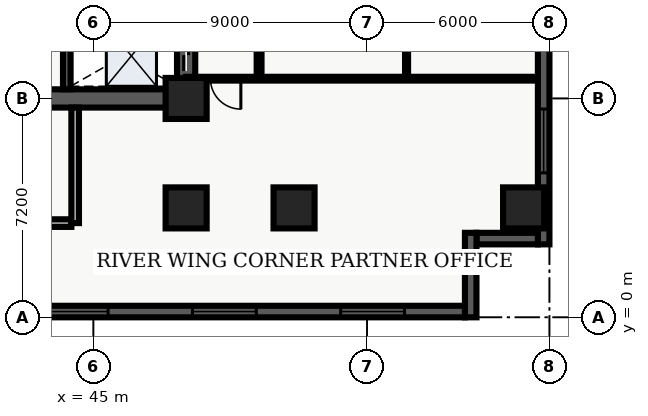
"""IFC4 building model, lengths in metres.
Left out: names, types, materials, properties, quantities, classifications, styles, units other than length and angle.
Written with IfcOpenShell. Run it as: python <this file> out.ifc"""

import sys

from ifc_helpers import new_model, entity, si_unit, converted_unit, direction, frame, origin_with_axes, origin_2d_with_axis, place, context, subcontext, project, spatial, polyline, rectangle, outline, extrude, element, fill, save


model = new_model("IFC4")
c1 = context("Model", 3, precision=1e-05, world=origin_with_axes(), true_north=direction((0.0, 1.0)))
c2 = subcontext(c1, "Body", "Model", "MODEL_VIEW")
j1 = project(units=[si_unit("LENGTHUNIT", "METRE"), converted_unit("PLANEANGLEUNIT", "DEGREE", entity("IfcPlaneAngleMeasure", 0.017), si_unit("PLANEANGLEUNIT", "RADIAN"), dimensions=[0, 0, 0, 0, 0, 0, 0])], contexts=[c1])
p1 = place(None, origin_with_axes())
s1 = spatial("IfcSite", under=j1, at=p1, CompositionType="ELEMENT")
p2 = place(p1, origin_with_axes())
s2 = spatial("IfcBuilding", under=s1, at=p2, CompositionType="ELEMENT")
p3 = place(p2, frame((0.0, 0.0, 36.6), z_axis=(0.0, 0.0, 1.0), x_axis=(1.0, 0.0, 0.0)))
s3 = spatial("IfcBuildingStorey", under=s2, at=p3, CompositionType="ELEMENT", Elevation=36.6)
p4 = place(p3, frame((40.2, 7.2, 0.0), z_axis=(0.0, 0.0, 1.0), x_axis=(1.0, 0.0, 0.0)))
e1 = element("IfcWall", 1, at=p4, inside=s3, PredefinedType="SHEAR", context=c2, shape_type="SweptSolid", body=[
    extrude(outline(polyline([(0.0, -0.3), (7.85, -0.3), (7.85, 0.3), (0.0, 0.3), (0.0, -0.3)])), origin_with_axes(), (0.0, 0.0, 1.0), 3.66),
])
p5 = place(p4, frame((2.175, 0.0, 0.0), z_axis=(0.0, 0.0, 1.0), x_axis=(1.0, 0.0, 0.0)))
e2 = element("IfcOpeningElement", 2, at=p5, cuts=e1, PredefinedType="OPENING", context=c2, shape_type="SweptSolid", body=[
    extrude(rectangle(XDim=1.05, YDim=0.62, at=origin_2d_with_axis()), origin_with_axes(), (0.0, 0.0, 1.0), 2.15),
])
p6 = place(p3, frame((48.05, 7.2, 0.0), z_axis=(0.0, 0.0, 1.0), x_axis=(0.0, 1.0, 0.0)))
e3 = element("IfcWall", 3, at=p6, inside=s3, PredefinedType="SHEAR", context=c2, shape_type="SweptSolid", body=[
    extrude(outline(polyline([(0.0, -0.3), (15.6, -0.3), (15.6, 0.3), (0.0, 0.3), (0.0, -0.3)])), origin_with_axes(), (0.0, 0.0, 1.0), 3.66),
])
p7 = place(p6, frame((1.425, 0.0, 0.0), z_axis=(0.0, 0.0, 1.0), x_axis=(1.0, 0.0, 0.0)))
e4 = element("IfcOpeningElement", 4, at=p7, cuts=e3, PredefinedType="OPENING", context=c2, shape_type="SweptSolid", body=[
    extrude(rectangle(XDim=1.05, YDim=0.62, at=origin_2d_with_axis()), origin_with_axes(), (0.0, 0.0, 1.0), 2.15),
])
p8 = place(p6, frame((3.475, 0.0, 0.0), z_axis=(0.0, 0.0, 1.0), x_axis=(1.0, 0.0, 0.0)))
e5 = element("IfcOpeningElement", 5, at=p8, cuts=e3, PredefinedType="OPENING", context=c2, shape_type="SweptSolid", body=[
    extrude(rectangle(XDim=1.05, YDim=0.62, at=origin_2d_with_axis()), origin_with_axes(), (0.0, 0.0, 1.0), 2.15),
])
p9 = place(p6, frame((5.625, 0.0, 0.0), z_axis=(0.0, 0.0, 1.0), x_axis=(1.0, 0.0, 0.0)))
e6 = element("IfcOpeningElement", 6, at=p9, cuts=e3, PredefinedType="OPENING", context=c2, shape_type="SweptSolid", body=[
    extrude(rectangle(XDim=0.95, YDim=0.62, at=origin_2d_with_axis()), origin_with_axes(), (0.0, 0.0, 1.0), 2.15),
])
p10 = place(p3, frame((44.125, 7.5, 0.0), z_axis=(0.0, 0.0, 1.0), x_axis=(0.0, 1.0, 0.0)))
e7 = element("IfcWall", 7, at=p10, inside=s3, PredefinedType="SHEAR", context=c2, shape_type="SweptSolid", body=[
    extrude(outline(polyline([(0.0, -0.125), (15.0, -0.125), (15.0, 0.125), (0.0, 0.125), (0.0, -0.125)])), origin_with_axes(), (0.0, 0.0, 1.0), 3.66),
])
p11 = place(p3, frame((40.325, 3.1, 0.0), z_axis=(0.0, 0.0, 1.0), x_axis=(1.0, 0.0, 0.0)))
e8 = element("IfcWall", 8, at=p11, inside=s3, PredefinedType="SOLIDWALL", context=c2, shape_type="SweptSolid", body=[
    extrude(outline(polyline([(0.0, -0.125), (3.95, -0.125), (3.95, 0.125), (0.0, 0.125), (0.0, -0.125)])), origin_with_axes(), (0.0, 0.0, 1.0), 2.7),
])
p12 = place(p3, frame((44.4, 3.1, 0.0), z_axis=(0.0, 0.0, 1.0), x_axis=(0.0, 1.0, 0.0)))
e9 = element("IfcWall", 9, at=p12, inside=s3, PredefinedType="SOLIDWALL", context=c2, shape_type="SweptSolid", body=[
    extrude(outline(polyline([(0.0, -0.125), (3.8, -0.125), (3.8, 0.125), (0.0, 0.125), (0.0, -0.125)])), origin_with_axes(), (0.0, 0.0, 1.0), 2.7),
])
for number, where, z_axis, x_axis in (
    (10, (48.05, 3.6, 0.0), (0.0, 0.0, 1.0), (1.0, 0.0, 0.0)),
    (11, (48.05, 7.2, 0.0), (0.0, 0.0, 1.0), (1.0, 0.0, 0.0)),
    (12, (51.6, 3.6, 0.0), (0.0, 0.0, 1.0), (1.0, 0.0, 0.0)),
    (13, (59.15, 3.6, 0.0), (0.0, 0.0, 1.0), (1.0, 0.0, 0.0)),
):
    element("IfcColumn", number, at=place(p3, frame(where, z_axis=z_axis, x_axis=x_axis)), inside=s3, PredefinedType="COLUMN", context=c2, shape_type="SweptSolid", body=[
        extrude(rectangle(XDim=1.35, YDim=1.35, at=origin_2d_with_axis()), origin_with_axes(), (0.0, 0.0, 1.0), 3.9),
    ])
p13 = place(p3, frame((50.45, 7.85, 0.0), z_axis=(0.0, 0.0, 1.0), x_axis=(0.0, 1.0, 0.0)))
e14 = element("IfcWall", 14, at=p13, inside=s3, PredefinedType="PARTITIONING", context=c2, shape_type="SweptSolid", body=[
    extrude(outline(polyline([(0.0, -0.08), (18.8, -0.08), (18.8, 0.08), (0.0, 0.08), (0.0, -0.08)])), origin_with_axes(), (0.0, 0.0, 1.0), 2.7),
])
p14 = place(p13, frame((4.564, 0.0, 0.0), z_axis=(0.0, 0.0, 1.0), x_axis=(1.0, 0.0, 0.0)))
e15 = element("IfcOpeningElement", 15, at=p14, cuts=e14, PredefinedType="OPENING", context=c2, shape_type="SweptSolid", body=[
    extrude(rectangle(XDim=1.0, YDim=0.18, at=origin_2d_with_axis()), origin_with_axes(), (0.0, 0.0, 1.0), 2.15),
])
p15 = place(p13, frame((11.541, 0.0, 0.0), z_axis=(0.0, 0.0, 1.0), x_axis=(1.0, 0.0, 0.0)))
e16 = element("IfcOpeningElement", 16, at=p15, cuts=e14, PredefinedType="OPENING", context=c2, shape_type="SweptSolid", body=[
    extrude(rectangle(XDim=1.0, YDim=0.18, at=origin_2d_with_axis()), origin_with_axes(), (0.0, 0.0, 1.0), 2.15),
])
p16 = place(p13, frame((14.125, 0.0, 0.0), z_axis=(0.0, 0.0, 1.0), x_axis=(1.0, 0.0, 0.0)))
e17 = element("IfcOpeningElement", 17, at=p16, cuts=e14, PredefinedType="OPENING", context=c2, shape_type="SweptSolid", body=[
    extrude(rectangle(XDim=1.0, YDim=0.18, at=origin_2d_with_axis()), origin_with_axes(), (0.0, 0.0, 1.0), 2.15),
])
p17 = place(p3, frame((59.64, 7.85, 0.0), z_axis=(0.0, 0.0, 1.0), x_axis=(-1.0, 0.0, 0.0)))
e18 = element("IfcWall", 18, at=p17, inside=s3, PredefinedType="PARTITIONING", context=c2, shape_type="SweptSolid", body=[
    extrude(outline(polyline([(0.0, -0.062), (11.59, -0.062), (11.59, 0.062), (0.0, 0.062), (0.0, -0.062)])), origin_with_axes(), (0.0, 0.0, 1.0), 2.7),
])
p18 = place(p17, frame((10.29, 0.0, 0.0), z_axis=(0.0, 0.0, 1.0), x_axis=(1.0, 0.0, 0.0)))
e19 = element("IfcOpeningElement", 19, at=p18, cuts=e18, PredefinedType="OPENING", context=c2, shape_type="SweptSolid", body=[
    extrude(rectangle(XDim=1.0, YDim=0.145, at=origin_2d_with_axis()), origin_with_axes(), (0.0, 0.0, 1.0), 2.15),
])
p19 = place(p3, frame((55.3, 7.98, 0.0), z_axis=(0.0, 0.0, 1.0), x_axis=(0.0, 1.0, 0.0)))
e20 = element("IfcWall", 20, at=p19, inside=s3, PredefinedType="PARTITIONING", context=c2, shape_type="SweptSolid", body=[
    extrude(outline(polyline([(0.0, -0.05), (18.54, -0.05), (18.54, 0.05), (0.0, 0.05), (0.0, -0.05)])), origin_with_axes(), (0.0, 0.0, 1.0), 2.7),
])
p20 = place(p19, frame((4.434, 0.0, 0.0), z_axis=(0.0, 0.0, 1.0), x_axis=(1.0, 0.0, 0.0)))
e21 = element("IfcOpeningElement", 21, at=p20, cuts=e20, PredefinedType="OPENING", context=c2, shape_type="SweptSolid", body=[
    extrude(rectangle(XDim=0.95, YDim=0.12, at=origin_2d_with_axis()), origin_with_axes(), (0.0, 0.0, 1.0), 2.15),
])
p21 = place(p19, frame((11.132, 0.0, 0.0), z_axis=(0.0, 0.0, 1.0), x_axis=(1.0, 0.0, 0.0)))
e22 = element("IfcOpeningElement", 22, at=p21, cuts=e20, PredefinedType="OPENING", context=c2, shape_type="SweptSolid", body=[
    extrude(rectangle(XDim=0.95, YDim=0.12, at=origin_2d_with_axis()), origin_with_axes(), (0.0, 0.0, 1.0), 2.15),
])
p22 = place(p19, frame((15.967, 0.0, 0.0), z_axis=(0.0, 0.0, 1.0), x_axis=(1.0, 0.0, 0.0)))
e23 = element("IfcOpeningElement", 23, at=p22, cuts=e20, PredefinedType="OPENING", context=c2, shape_type="SweptSolid", body=[
    extrude(rectangle(XDim=0.95, YDim=0.12, at=origin_2d_with_axis()), origin_with_axes(), (0.0, 0.0, 1.0), 2.15),
])
p23 = place(p3, frame((59.81, 26.02, 0.0), z_axis=(0.0, 0.0, 1.0), x_axis=(0.0, -1.0, 0.0)))
e24 = element("IfcWall", 24, at=p23, inside=s3, PredefinedType="SOLIDWALL", context=c2, shape_type="SweptSolid", body=[
    extrude(outline(polyline([(0.0, -0.19), (23.62, -0.19), (23.62, 0.19), (0.0, 0.19), (0.0, -0.19)])), origin_with_axes(), (0.0, 0.0, 1.0), 3.66),
])
p24 = place(p23, frame((20.218, 0.0, 0.45), z_axis=(0.0, 0.0, 1.0), x_axis=(1.0, 0.0, 0.0)))
e25 = element("IfcOpeningElement", 25, at=p24, cuts=e24, PredefinedType="OPENING", context=c2, shape_type="SweptSolid", body=[
    extrude(rectangle(XDim=2.1, YDim=0.4, at=origin_2d_with_axis()), origin_with_axes(), (0.0, 0.0, 1.0), 2.2),
])
p25 = place(p3, frame((59.62, 2.59, 0.0), z_axis=(0.0, 0.0, 1.0), x_axis=(-1.0, 0.0, 0.0)))
e26 = element("IfcWall", 26, at=p25, inside=s3, PredefinedType="SOLIDWALL", context=c2, shape_type="SweptSolid", body=[
    extrude(outline(polyline([(0.0, -0.19), (2.02, -0.19), (2.02, 0.19), (0.0, 0.19), (0.0, -0.19)])), origin_with_axes(), (0.0, 0.0, 1.0), 3.66),
])
p26 = place(p3, frame((57.41, 2.78, 0.0), z_axis=(0.0, 0.0, 1.0), x_axis=(0.0, -1.0, 0.0)))
e27 = element("IfcWall", 27, at=p26, inside=s3, PredefinedType="SOLIDWALL", context=c2, shape_type="SweptSolid", body=[
    extrude(outline(polyline([(0.0, -0.19), (2.78, -0.19), (2.78, 0.19), (0.0, 0.19), (0.0, -0.19)])), origin_with_axes(), (0.0, 0.0, 1.0), 3.66),
])
p27 = place(p3, frame((57.22, 0.19, 0.0), z_axis=(0.0, 0.0, 1.0), x_axis=(-1.0, 0.0, 0.0)))
e28 = element("IfcWall", 28, at=p27, inside=s3, PredefinedType="SOLIDWALL", context=c2, shape_type="SweptSolid", body=[
    extrude(outline(polyline([(0.0, -0.19), (54.82, -0.19), (54.82, 0.19), (0.0, 0.19), (0.0, -0.19)])), origin_with_axes(), (0.0, 0.0, 1.0), 3.66),
])
p28 = place(p27, frame((3.037, 0.0, 0.45), z_axis=(0.0, 0.0, 1.0), x_axis=(1.0, 0.0, 0.0)))
e29 = element("IfcOpeningElement", 29, at=p28, cuts=e28, PredefinedType="OPENING", context=c2, shape_type="SweptSolid", body=[
    extrude(rectangle(XDim=2.1, YDim=0.4, at=origin_2d_with_axis()), origin_with_axes(), (0.0, 0.0, 1.0), 2.2),
])
p29 = place(p27, frame((7.912, 0.0, 0.45), z_axis=(0.0, 0.0, 1.0), x_axis=(1.0, 0.0, 0.0)))
e30 = element("IfcOpeningElement", 30, at=p29, cuts=e28, PredefinedType="OPENING", context=c2, shape_type="SweptSolid", body=[
    extrude(rectangle(XDim=2.1, YDim=0.4, at=origin_2d_with_axis()), origin_with_axes(), (0.0, 0.0, 1.0), 2.2),
])
p30 = place(p27, frame((12.786, 0.0, 0.45), z_axis=(0.0, 0.0, 1.0), x_axis=(1.0, 0.0, 0.0)))
e31 = element("IfcOpeningElement", 31, at=p30, cuts=e28, PredefinedType="OPENING", context=c2, shape_type="SweptSolid", body=[
    extrude(rectangle(XDim=2.1, YDim=0.4, at=origin_2d_with_axis()), origin_with_axes(), (0.0, 0.0, 1.0), 2.2),
])
p31 = place(p27, frame((17.661, 0.0, 0.45), z_axis=(0.0, 0.0, 1.0), x_axis=(1.0, 0.0, 0.0)))
e32 = element("IfcOpeningElement", 32, at=p31, cuts=e28, PredefinedType="OPENING", context=c2, shape_type="SweptSolid", body=[
    extrude(rectangle(XDim=2.1, YDim=0.4, at=origin_2d_with_axis()), origin_with_axes(), (0.0, 0.0, 1.0), 2.2),
])
p32 = place(p27, frame((22.535, 0.0, 0.45), z_axis=(0.0, 0.0, 1.0), x_axis=(1.0, 0.0, 0.0)))
e33 = element("IfcOpeningElement", 33, at=p32, cuts=e28, PredefinedType="OPENING", context=c2, shape_type="SweptSolid", body=[
    extrude(rectangle(XDim=2.1, YDim=0.4, at=origin_2d_with_axis()), origin_with_axes(), (0.0, 0.0, 1.0), 2.2),
])
p33 = place(p27, frame((27.41, 0.0, 0.45), z_axis=(0.0, 0.0, 1.0), x_axis=(1.0, 0.0, 0.0)))
e34 = element("IfcOpeningElement", 34, at=p33, cuts=e28, PredefinedType="OPENING", context=c2, shape_type="SweptSolid", body=[
    extrude(rectangle(XDim=2.1, YDim=0.4, at=origin_2d_with_axis()), origin_with_axes(), (0.0, 0.0, 1.0), 2.2),
])
p34 = place(p27, frame((32.285, 0.0, 0.45), z_axis=(0.0, 0.0, 1.0), x_axis=(1.0, 0.0, 0.0)))
e35 = element("IfcOpeningElement", 35, at=p34, cuts=e28, PredefinedType="OPENING", context=c2, shape_type="SweptSolid", body=[
    extrude(rectangle(XDim=2.1, YDim=0.4, at=origin_2d_with_axis()), origin_with_axes(), (0.0, 0.0, 1.0), 2.2),
])
p35 = place(p27, frame((37.159, 0.0, 0.45), z_axis=(0.0, 0.0, 1.0), x_axis=(1.0, 0.0, 0.0)))
e36 = element("IfcOpeningElement", 36, at=p35, cuts=e28, PredefinedType="OPENING", context=c2, shape_type="SweptSolid", body=[
    extrude(rectangle(XDim=2.1, YDim=0.4, at=origin_2d_with_axis()), origin_with_axes(), (0.0, 0.0, 1.0), 2.2),
])
p36 = place(p27, frame((42.034, 0.0, 0.45), z_axis=(0.0, 0.0, 1.0), x_axis=(1.0, 0.0, 0.0)))
e37 = element("IfcOpeningElement", 37, at=p36, cuts=e28, PredefinedType="OPENING", context=c2, shape_type="SweptSolid", body=[
    extrude(rectangle(XDim=2.1, YDim=0.4, at=origin_2d_with_axis()), origin_with_axes(), (0.0, 0.0, 1.0), 2.2),
])
p37 = place(p27, frame((51.783, 0.0, 0.45), z_axis=(0.0, 0.0, 1.0), x_axis=(1.0, 0.0, 0.0)))
e38 = element("IfcOpeningElement", 38, at=p37, cuts=e28, PredefinedType="OPENING", context=c2, shape_type="SweptSolid", body=[
    extrude(rectangle(XDim=2.1, YDim=0.4, at=origin_2d_with_axis()), origin_with_axes(), (0.0, 0.0, 1.0), 2.2),
])
p38 = place(p6, frame((1.425, 0.0, 0.0), z_axis=(0.0, 0.0, 1.0), x_axis=(1.0, 0.0, 0.0)))
e39 = element("IfcDoor", 39, at=p38, inside=s3, OperationType="SLIDING_TO_LEFT", PredefinedType="DOOR", context=c2, shape_type="SweptSolid", body=[
    extrude(rectangle(XDim=1.05, YDim=0.09, at=origin_2d_with_axis()), origin_with_axes(), (0.0, 0.0, 1.0), 2.15),
])
fill(e4, e39)
p39 = place(p17, frame((10.29, 0.0, 0.0), z_axis=(0.0, 0.0, 1.0), x_axis=(1.0, 0.0, 0.0)))
e40 = element("IfcDoor", 40, at=p39, inside=s3, OperationType="SINGLE_SWING_LEFT", PredefinedType="DOOR", context=c2, shape_type="SweptSolid", body=[
    extrude(rectangle(XDim=1.0, YDim=0.075, at=origin_2d_with_axis()), origin_with_axes(), (0.0, 0.0, 1.0), 2.15),
])
fill(e19, e40)
p40 = place(p23, frame((20.218, 0.0, 0.45), z_axis=(0.0, 0.0, 1.0), x_axis=(1.0, 0.0, 0.0)))
e41 = element("IfcWindow", 41, at=p40, inside=s3, PredefinedType="WINDOW", context=c2, shape_type="SweptSolid", body=[
    extrude(rectangle(XDim=2.1, YDim=0.09, at=origin_2d_with_axis()), origin_with_axes(), (0.0, 0.0, 1.0), 2.2),
])
fill(e25, e41)
p41 = place(p27, frame((3.037, 0.0, 0.45), z_axis=(0.0, 0.0, 1.0), x_axis=(1.0, 0.0, 0.0)))
e42 = element("IfcWindow", 42, at=p41, inside=s3, PredefinedType="WINDOW", context=c2, shape_type="SweptSolid", body=[
    extrude(rectangle(XDim=2.1, YDim=0.09, at=origin_2d_with_axis()), origin_with_axes(), (0.0, 0.0, 1.0), 2.2),
])
fill(e29, e42)
p42 = place(p27, frame((7.912, 0.0, 0.45), z_axis=(0.0, 0.0, 1.0), x_axis=(1.0, 0.0, 0.0)))
e43 = element("IfcWindow", 43, at=p42, inside=s3, PredefinedType="WINDOW", context=c2, shape_type="SweptSolid", body=[
    extrude(rectangle(XDim=2.1, YDim=0.09, at=origin_2d_with_axis()), origin_with_axes(), (0.0, 0.0, 1.0), 2.2),
])
fill(e30, e43)
p43 = place(p27, frame((12.786, 0.0, 0.45), z_axis=(0.0, 0.0, 1.0), x_axis=(1.0, 0.0, 0.0)))
e44 = element("IfcWindow", 44, at=p43, inside=s3, PredefinedType="WINDOW", context=c2, shape_type="SweptSolid", body=[
    extrude(rectangle(XDim=2.1, YDim=0.09, at=origin_2d_with_axis()), origin_with_axes(), (0.0, 0.0, 1.0), 2.2),
])
fill(e31, e44)
save(model, sys.argv[1])
